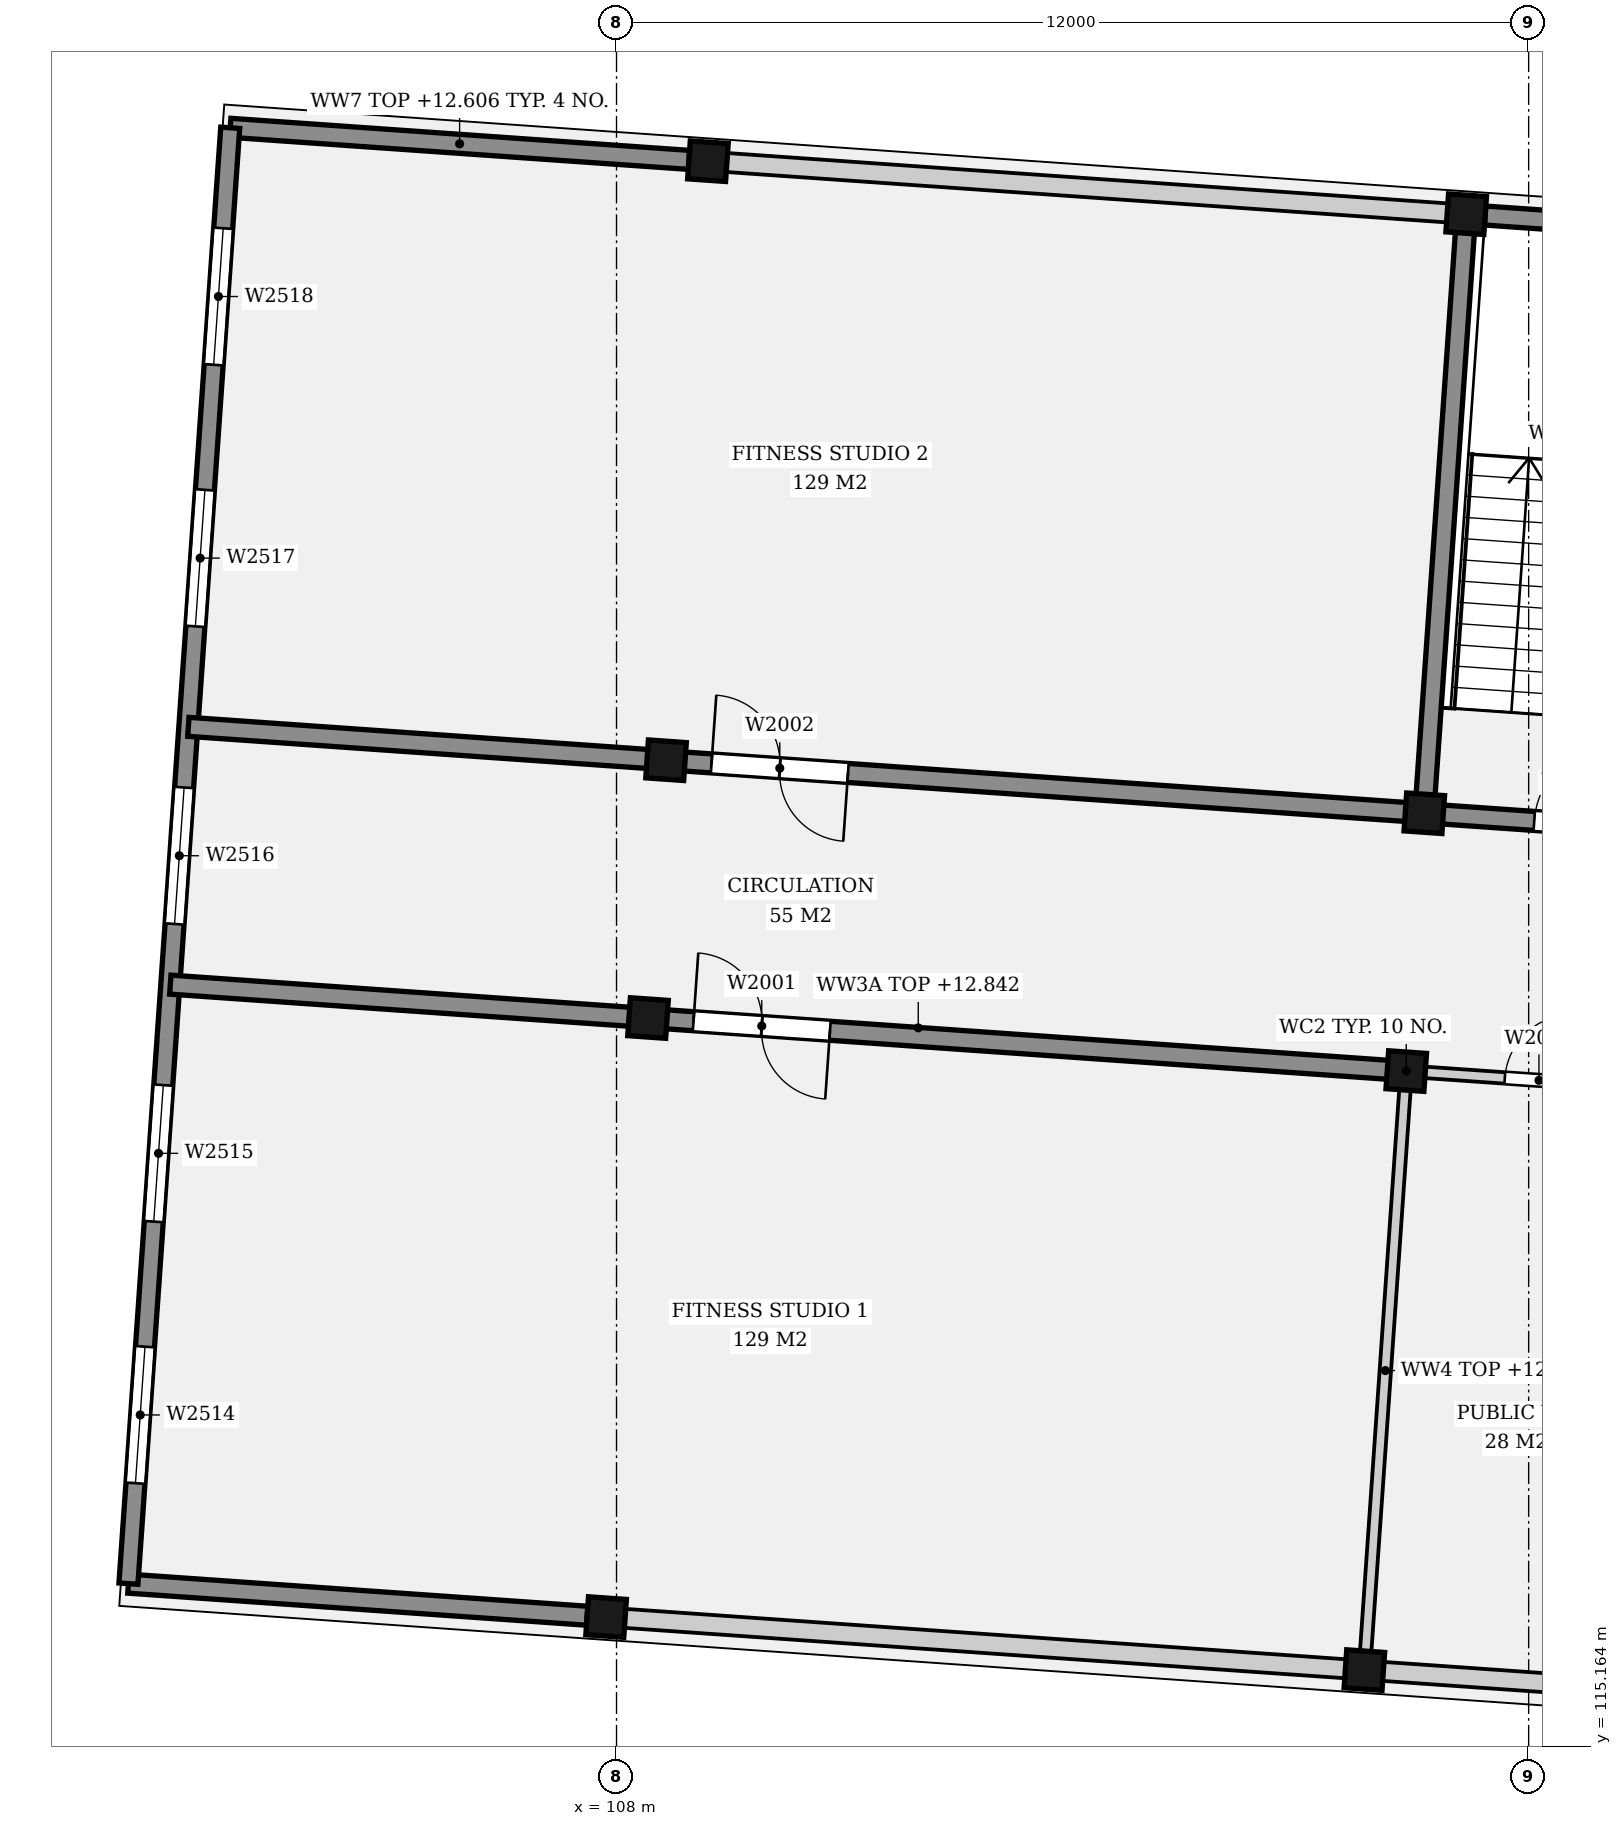
"""IFC4 building model, lengths in metres.
Left out: names, types, materials, properties, quantities, classifications, styles, units other than length and angle.
Written with IfcOpenShell. Run it as: python <this file> out.ifc"""

import sys

from ifc_helpers import new_model, si_unit, direction, frame, frame_2d, origin, origin_2d, place, context, subcontext, project, spatial, rectangle, extrude, element, fill, save


model = new_model("IFC4")
c1 = context("Model", 3, precision=1e-05, world=origin(), true_north=direction((0.0, 1.0)))
c2 = subcontext(c1, "Body", "Model", "MODEL_VIEW")
j1 = project(units=[si_unit("LENGTHUNIT", "METRE"), si_unit("PLANEANGLEUNIT", "RADIAN")], contexts=[c1])
p1 = place(None, origin())
s1 = spatial("IfcSite", under=j1, at=p1, CompositionType="ELEMENT")
p2 = place(p1, origin())
s2 = spatial("IfcBuilding", under=s1, at=p2, CompositionType="ELEMENT")
p3 = place(p2, frame((0.0, 0.0, 9.4)))
s3 = spatial("IfcBuildingStorey", under=s2, at=p3, CompositionType="ELEMENT", Elevation=9.4)
for number, where, z_axis, x_axis in (
    (1, (107.863, 116.865, 0.0), (0.0, 0.0, 1.0), (0.998, -0.07, 0.0)),
    (2, (108.414, 124.746, 0.0), (0.0, 0.0, 1.0), (0.998, -0.07, 0.0)),
    (3, (108.652, 128.138, 0.0), (0.0, 0.0, 1.0), (0.998, -0.07, 0.0)),
    (4, (109.202, 136.018, 0.0), (0.0, 0.0, 1.0), (0.998, -0.07, 0.0)),
    (5, (117.839, 116.167, 0.0), (0.0, 0.0, 1.0), (0.998, -0.07, 0.0)),
    (6, (118.39, 124.048, 0.0), (0.0, 0.0, 1.0), (0.998, -0.07, 0.0)),
    (7, (118.627, 127.44, 0.0), (0.0, 0.0, 1.0), (0.998, -0.07, 0.0)),
    (8, (119.178, 135.321, 0.0), (0.0, 0.0, 1.0), (0.998, -0.07, 0.0)),
):
    element("IfcColumn", number, at=place(p3, frame(where, z_axis=z_axis, x_axis=x_axis)), inside=s3, PredefinedType="COLUMN", context=c2, shape_type="SweptSolid", body=[
        extrude(rectangle(XDim=0.5, YDim=0.5, at=origin_2d()), origin(), (0.0, 0.0, 1.0), 4.4),
    ])
p4 = place(p3, frame((101.579, 117.305, 0.0), z_axis=(0.0, 0.0, 1.0), x_axis=(0.997562901013, -0.06977290679, 0.0)))
e9 = element("IfcWall", 9, at=p4, inside=s3, PredefinedType="SOLIDWALL", context=c2, shape_type="SweptSolid", body=[
    extrude(rectangle(XDim=6.05, YDim=0.25, at=frame_2d((3.025, 0.0))), origin(), (0.0, 0.0, 1.0), 3.206),
])
p5 = place(p3, frame((108.113, 116.848, 0.0), z_axis=(0.0, 0.0, 1.0), x_axis=(0.997564799463, -0.069745758817, 0.0)))
e10 = element("IfcWall", 10, at=p5, inside=s3, PredefinedType="SOLIDWALL", context=c2, shape_type="SweptSolid", body=[
    extrude(rectangle(XDim=9.5, YDim=0.25, at=frame_2d((4.75, 0.0))), origin(), (0.0, 0.0, 1.0), 3.206),
])
p6 = place(p3, frame((118.088, 116.15, 0.0), z_axis=(0.0, 0.0, 1.0), x_axis=(0.997562886035, -0.069773120941, 0.0)))
e11 = element("IfcWall", 11, at=p6, inside=s3, PredefinedType="SOLIDWALL", context=c2, shape_type="SweptSolid", body=[
    extrude(rectangle(XDim=9.5, YDim=0.25, at=frame_2d((4.75, 0.0))), origin(), (0.0, 0.0, 1.0), 3.57),
])
p7 = place(p3, frame((102.918, 136.458, 0.0), z_axis=(0.0, 0.0, 1.0), x_axis=(0.997565709001, -0.06973274859, 0.0)))
e12 = element("IfcWall", 12, at=p7, inside=s3, PredefinedType="SOLIDWALL", context=c2, shape_type="SweptSolid", body=[
    extrude(rectangle(XDim=6.05, YDim=0.25, at=frame_2d((3.025, 0.0))), origin(), (0.0, 0.0, 1.0), 3.206),
])
p8 = place(p3, frame((109.452, 136.001, 0.0), z_axis=(0.0, 0.0, 1.0), x_axis=(0.997562886035, -0.069773120941, 0.0)))
e13 = element("IfcWall", 13, at=p8, inside=s3, PredefinedType="SOLIDWALL", context=c2, shape_type="SweptSolid", body=[
    extrude(rectangle(XDim=9.5, YDim=0.25, at=frame_2d((4.75, 0.0))), origin(), (0.0, 0.0, 1.0), 3.206),
])
p9 = place(p3, frame((119.427, 135.303, 0.0), z_axis=(0.0, 0.0, 1.0), x_axis=(0.997564674448, -0.06974754686, 0.0)))
e14 = element("IfcWall", 14, at=p9, inside=s3, PredefinedType="SOLIDWALL", context=c2, shape_type="SweptSolid", body=[
    extrude(rectangle(XDim=9.5, YDim=0.25, at=frame_2d((4.75, 0.0))), origin(), (0.0, 0.0, 1.0), 3.57),
])
p10 = place(p3, frame((101.579, 117.305, 0.0), z_axis=(0.0, 0.0, 1.0), x_axis=(0.069758646115, 0.99756389835, 0.0)))
e15 = element("IfcWall", 15, at=p10, inside=s3, PredefinedType="SOLIDWALL", context=c2, shape_type="SweptSolid", body=[
    extrude(rectangle(XDim=19.2, YDim=0.25, at=frame_2d((9.6, 0.0))), origin(), (0.0, 0.0, 1.0), 3.206),
])
p11 = place(p10, frame((1.325, 0.0, 0.9)))
e16 = element("IfcOpeningElement", 16, at=p11, cuts=e15, PredefinedType="OPENING", context=c2, shape_type="SweptSolid", body=[
    extrude(rectangle(XDim=1.8, YDim=2.4, at=frame_2d((0.9, 1.2))), frame((0.0, 0.135, 0.0), z_axis=(0.0, -1.0, 0.0), x_axis=(1.0, 0.0, 0.0)), (0.0, 0.0, 1.0), 0.27),
])
p12 = place(p10, frame((4.775, 0.0, 0.9)))
e17 = element("IfcOpeningElement", 17, at=p12, cuts=e15, PredefinedType="OPENING", context=c2, shape_type="SweptSolid", body=[
    extrude(rectangle(XDim=1.8, YDim=2.4, at=frame_2d((0.9, 1.2))), frame((0.0, 0.135, 0.0), z_axis=(0.0, -1.0, 0.0), x_axis=(1.0, 0.0, 0.0)), (0.0, 0.0, 1.0), 0.27),
])
p13 = place(p10, frame((8.7, 0.0, 0.9)))
e18 = element("IfcOpeningElement", 18, at=p13, cuts=e15, PredefinedType="OPENING", context=c2, shape_type="SweptSolid", body=[
    extrude(rectangle(XDim=1.8, YDim=2.4, at=frame_2d((0.9, 1.2))), frame((0.0, 0.135, 0.0), z_axis=(0.0, -1.0, 0.0), x_axis=(1.0, 0.0, 0.0)), (0.0, 0.0, 1.0), 0.27),
])
p14 = place(p10, frame((12.625, 0.0, 0.9)))
e19 = element("IfcOpeningElement", 19, at=p14, cuts=e15, PredefinedType="OPENING", context=c2, shape_type="SweptSolid", body=[
    extrude(rectangle(XDim=1.8, YDim=2.4, at=frame_2d((0.9, 1.2))), frame((0.0, 0.135, 0.0), z_axis=(0.0, -1.0, 0.0), x_axis=(1.0, 0.0, 0.0)), (0.0, 0.0, 1.0), 0.27),
])
p15 = place(p10, frame((16.075, 0.0, 0.9)))
e20 = element("IfcOpeningElement", 20, at=p15, cuts=e15, PredefinedType="OPENING", context=c2, shape_type="SweptSolid", body=[
    extrude(rectangle(XDim=1.8, YDim=2.4, at=frame_2d((0.9, 1.2))), frame((0.0, 0.135, 0.0), z_axis=(0.0, -1.0, 0.0), x_axis=(1.0, 0.0, 0.0)), (0.0, 0.0, 1.0), 0.27),
])
p16 = place(p3, frame((117.839, 116.167, 0.0), z_axis=(0.0, 0.0, 1.0), x_axis=(0.0697491702, 0.997564560947, 0.0)))
e21 = element("IfcWall", 21, at=p16, inside=s3, PredefinedType="PARTITIONING", context=c2, shape_type="SweptSolid", body=[
    extrude(rectangle(XDim=7.9, YDim=0.15, at=frame_2d((3.95, 0.0))), origin(), (0.0, 0.0, 1.0), 3.206),
])
p17 = place(p3, frame((118.627, 127.44, 0.0), z_axis=(0.0, 0.0, 1.0), x_axis=(0.0697491702, 0.997564560947, 0.0)))
e22 = element("IfcWall", 22, at=p17, inside=s3, PredefinedType="SOLIDWALL", context=c2, shape_type="SweptSolid", body=[
    extrude(rectangle(XDim=7.9, YDim=0.25, at=frame_2d((3.95, 0.0))), origin(), (0.0, 0.0, 1.0), 3.206),
])
p18 = place(p3, frame((102.13, 125.185, 0.0), z_axis=(0.0, 0.0, 1.0), x_axis=(0.997564327004, -0.069752516003, 0.0)))
e23 = element("IfcWall", 23, at=p18, inside=s3, PredefinedType="PARTITIONING", context=c2, shape_type="SweptSolid", body=[
    extrude(rectangle(XDim=16.3, YDim=0.25, at=frame_2d((8.15, 0.0))), origin(), (0.0, 0.0, 1.0), 3.442),
])
p19 = place(p18, frame((6.9, 0.0, 0.0)))
e24 = element("IfcOpeningElement", 24, at=p19, cuts=e23, PredefinedType="OPENING", context=c2, shape_type="SweptSolid", body=[
    extrude(rectangle(XDim=1.8, YDim=2.1, at=frame_2d((0.9, 1.05))), frame((0.0, 0.135, 0.0), z_axis=(0.0, -1.0, 0.0), x_axis=(1.0, 0.0, 0.0)), (0.0, 0.0, 1.0), 0.27),
])
p20 = place(p3, frame((118.39, 124.048, 0.0), z_axis=(0.0, 0.0, 1.0), x_axis=(0.997562707158, -0.069775678342, 0.0)))
e25 = element("IfcWall", 25, at=p20, inside=s3, PredefinedType="PARTITIONING", context=c2, shape_type="SweptSolid", body=[
    extrude(rectangle(XDim=10.0, YDim=0.15, at=frame_2d((5.0, 0.0))), origin(), (0.0, 0.0, 1.0), 3.57),
])
p21 = place(p20, frame((1.3, 0.0, 0.0)))
e26 = element("IfcOpeningElement", 26, at=p21, cuts=e25, PredefinedType="OPENING", context=c2, shape_type="SweptSolid", body=[
    extrude(rectangle(XDim=0.9, YDim=2.1, at=frame_2d((0.45, 1.05))), frame((0.0, 0.085, 0.0), z_axis=(0.0, -1.0, 0.0), x_axis=(1.0, 0.0, 0.0)), (0.0, 0.0, 1.0), 0.17),
])
p22 = place(p20, frame((5.05, 0.0, 0.0)))
e27 = element("IfcOpeningElement", 27, at=p22, cuts=e25, PredefinedType="OPENING", context=c2, shape_type="SweptSolid", body=[
    extrude(rectangle(XDim=0.9, YDim=2.1, at=frame_2d((0.45, 1.05))), frame((0.0, 0.085, 0.0), z_axis=(0.0, -1.0, 0.0), x_axis=(1.0, 0.0, 0.0)), (0.0, 0.0, 1.0), 0.17),
])
p23 = place(p20, frame((8.3, 0.0, 0.0)))
e28 = element("IfcOpeningElement", 28, at=p23, cuts=e25, PredefinedType="OPENING", context=c2, shape_type="SweptSolid", body=[
    extrude(rectangle(XDim=0.9, YDim=2.1, at=frame_2d((0.45, 1.05))), frame((0.0, 0.085, 0.0), z_axis=(0.0, -1.0, 0.0), x_axis=(1.0, 0.0, 0.0)), (0.0, 0.0, 1.0), 0.17),
])
p24 = place(p3, frame((102.367, 128.577, 0.0), z_axis=(0.0, 0.0, 1.0), x_axis=(0.997564399877, -0.069751473811, 0.0)))
e29 = element("IfcWall", 29, at=p24, inside=s3, PredefinedType="PARTITIONING", context=c2, shape_type="SweptSolid", body=[
    extrude(rectangle(XDim=16.3, YDim=0.25, at=frame_2d((8.15, 0.0))), origin(), (0.0, 0.0, 1.0), 3.442),
])
p25 = place(p24, frame((6.9, 0.0, 0.0)))
e30 = element("IfcOpeningElement", 30, at=p25, cuts=e29, PredefinedType="OPENING", context=c2, shape_type="SweptSolid", body=[
    extrude(rectangle(XDim=1.8, YDim=2.1, at=frame_2d((0.9, 1.05))), frame((0.0, 0.135, 0.0), z_axis=(0.0, -1.0, 0.0), x_axis=(1.0, 0.0, 0.0)), (0.0, 0.0, 1.0), 0.27),
])
p26 = place(p3, frame((118.627, 127.44, 0.0), z_axis=(0.0, 0.0, 1.0), x_axis=(0.997563556766, -0.069763530677, 0.0)))
e31 = element("IfcWall", 31, at=p26, inside=s3, PredefinedType="SOLIDWALL", context=c2, shape_type="SweptSolid", body=[
    extrude(rectangle(XDim=4.0, YDim=0.25, at=frame_2d((2.0, 0.0))), origin(), (0.0, 0.0, 1.0), 3.57),
])
p27 = place(p26, frame((1.45, 0.0, 0.0)))
e32 = element("IfcOpeningElement", 32, at=p27, cuts=e31, PredefinedType="OPENING", context=c2, shape_type="SweptSolid", body=[
    extrude(rectangle(XDim=1.1, YDim=2.1, at=frame_2d((0.55, 1.05))), frame((0.0, 0.135, 0.0), z_axis=(0.0, -1.0, 0.0), x_axis=(1.0, 0.0, 0.0)), (0.0, 0.0, 1.0), 0.27),
])
p28 = place(p11, origin())
e33 = element("IfcWindow", 33, at=p28, inside=s3, PartitioningType="SINGLE_PANEL", PredefinedType="WINDOW", context=c2, shape_type="SweptSolid", body=[
    extrude(rectangle(XDim=1.8, YDim=2.4, at=frame_2d((0.9, 1.2))), frame((0.0, 0.03, 0.0), z_axis=(0.0, -1.0, 0.0), x_axis=(1.0, 0.0, 0.0)), (0.0, 0.0, 1.0), 0.06),
])
fill(e16, e33)
p29 = place(p12, origin())
e34 = element("IfcWindow", 34, at=p29, inside=s3, PartitioningType="SINGLE_PANEL", PredefinedType="WINDOW", context=c2, shape_type="SweptSolid", body=[
    extrude(rectangle(XDim=1.8, YDim=2.4, at=frame_2d((0.9, 1.2))), frame((0.0, 0.03, 0.0), z_axis=(0.0, -1.0, 0.0), x_axis=(1.0, 0.0, 0.0)), (0.0, 0.0, 1.0), 0.06),
])
fill(e17, e34)
p30 = place(p13, origin())
e35 = element("IfcWindow", 35, at=p30, inside=s3, PartitioningType="SINGLE_PANEL", PredefinedType="WINDOW", context=c2, shape_type="SweptSolid", body=[
    extrude(rectangle(XDim=1.8, YDim=2.4, at=frame_2d((0.9, 1.2))), frame((0.0, 0.03, 0.0), z_axis=(0.0, -1.0, 0.0), x_axis=(1.0, 0.0, 0.0)), (0.0, 0.0, 1.0), 0.06),
])
fill(e18, e35)
p31 = place(p14, origin())
e36 = element("IfcWindow", 36, at=p31, inside=s3, PartitioningType="SINGLE_PANEL", PredefinedType="WINDOW", context=c2, shape_type="SweptSolid", body=[
    extrude(rectangle(XDim=1.8, YDim=2.4, at=frame_2d((0.9, 1.2))), frame((0.0, 0.03, 0.0), z_axis=(0.0, -1.0, 0.0), x_axis=(1.0, 0.0, 0.0)), (0.0, 0.0, 1.0), 0.06),
])
fill(e19, e36)
p32 = place(p15, origin())
e37 = element("IfcWindow", 37, at=p32, inside=s3, PartitioningType="SINGLE_PANEL", PredefinedType="WINDOW", context=c2, shape_type="SweptSolid", body=[
    extrude(rectangle(XDim=1.8, YDim=2.4, at=frame_2d((0.9, 1.2))), frame((0.0, 0.03, 0.0), z_axis=(0.0, -1.0, 0.0), x_axis=(1.0, 0.0, 0.0)), (0.0, 0.0, 1.0), 0.06),
])
fill(e20, e37)
p33 = place(p19, origin())
e38 = element("IfcDoor", 38, at=p33, inside=s3, OperationType="DOUBLE_DOOR_SINGLE_SWING", PredefinedType="DOOR", context=c2, shape_type="SweptSolid", body=[
    extrude(rectangle(XDim=1.8, YDim=2.1, at=frame_2d((0.9, 1.05))), frame((0.0, 0.025, 0.0), z_axis=(0.0, -1.0, 0.0), x_axis=(1.0, 0.0, 0.0)), (0.0, 0.0, 1.0), 0.05),
])
fill(e24, e38)
p34 = place(p25, origin())
e39 = element("IfcDoor", 39, at=p34, inside=s3, OperationType="DOUBLE_DOOR_SINGLE_SWING", PredefinedType="DOOR", context=c2, shape_type="SweptSolid", body=[
    extrude(rectangle(XDim=1.8, YDim=2.1, at=frame_2d((0.9, 1.05))), frame((0.0, 0.025, 0.0), z_axis=(0.0, -1.0, 0.0), x_axis=(1.0, 0.0, 0.0)), (0.0, 0.0, 1.0), 0.05),
])
fill(e30, e39)
p35 = place(p21, origin())
e40 = element("IfcDoor", 40, at=p35, inside=s3, OperationType="SINGLE_SWING_RIGHT", PredefinedType="DOOR", context=c2, shape_type="SweptSolid", body=[
    extrude(rectangle(XDim=0.9, YDim=2.1, at=frame_2d((0.45, 1.05))), frame((0.0, 0.025, 0.0), z_axis=(0.0, -1.0, 0.0), x_axis=(1.0, 0.0, 0.0)), (0.0, 0.0, 1.0), 0.05),
])
fill(e26, e40)
p36 = place(p27, origin())
e41 = element("IfcDoor", 41, at=p36, inside=s3, OperationType="SINGLE_SWING_RIGHT", PredefinedType="DOOR", context=c2, shape_type="SweptSolid", body=[
    extrude(rectangle(XDim=1.1, YDim=2.1, at=frame_2d((0.55, 1.05))), frame((0.0, 0.025, 0.0), z_axis=(0.0, -1.0, 0.0), x_axis=(1.0, 0.0, 0.0)), (0.0, 0.0, 1.0), 0.05),
])
fill(e32, e41)
save(model, sys.argv[1])
